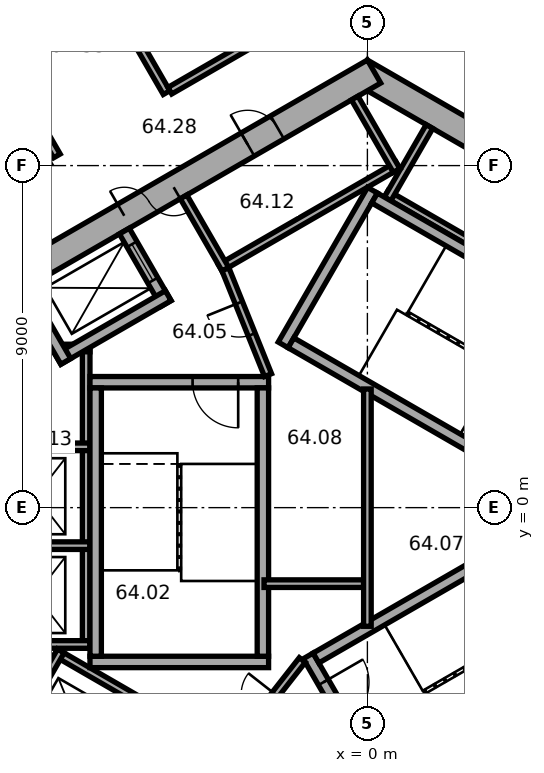
"""IFC4 building model, lengths in metres.
Left out: names, types, materials, properties, quantities, classifications, styles, units other than length and angle.
Written with IfcOpenShell. Run it as: python <this file> out.ifc"""

import sys

from ifc_helpers import new_model, si_unit, direction, frame, frame_2d, origin, place, context, subcontext, project, spatial, rectangle, extrude, element, fill, save


model = new_model("IFC4")
c1 = context("Model", 3, precision=1e-05, world=origin(), true_north=direction((0.0, 1.0)))
c2 = subcontext(c1, "Body", "Model", "MODEL_VIEW")
j1 = project(units=[si_unit("LENGTHUNIT", "METRE"), si_unit("PLANEANGLEUNIT", "RADIAN")], contexts=[c1])
p1 = place(None, origin())
s1 = spatial("IfcSite", under=j1, at=p1, CompositionType="ELEMENT")
p2 = place(p1, origin())
s2 = spatial("IfcBuilding", under=s1, at=p2, CompositionType="ELEMENT")
p3 = place(p2, frame((0.0, 0.0, 259.8)))
s3 = spatial("IfcBuildingStorey", under=s2, at=p3, CompositionType="ELEMENT", Elevation=259.8)
p4 = place(p3, frame((10.025, 5.586, 0.0), z_axis=(0.0, 0.0, 1.0), x_axis=(-0.866026453023, 0.499998182661, 0.0)))
e1 = element("IfcWall", 1, at=p4, inside=s3, PredefinedType="SHEAR", context=c2, shape_type="SweptSolid", body=[
    extrude(rectangle(XDim=11.778, YDim=0.7, at=frame_2d((5.889, 0.0))), origin(), (0.0, 0.0, 1.0), 3.7),
])
p5 = place(p4, frame((5.139, 0.0, 0.0)))
e2 = element("IfcOpeningElement", 2, at=p5, cuts=e1, PredefinedType="OPENING", context=c2, shape_type="SweptSolid", body=[
    extrude(rectangle(XDim=0.9, YDim=2.1, at=frame_2d((0.45, 1.05))), frame((0.0, 0.36, 0.0), z_axis=(0.0, -1.0, 0.0), x_axis=(1.0, 0.0, 0.0)), (0.0, 0.0, 1.0), 0.72),
])
p6 = place(p3, frame((0.175, 11.475, 0.0), z_axis=(0.0, 0.0, 1.0), x_axis=(-0.866026453023, -0.499998182661, 0.0)))
e3 = element("IfcWall", 3, at=p6, inside=s3, PredefinedType="SHEAR", context=c2, shape_type="SweptSolid", body=[
    extrude(rectangle(XDim=11.778, YDim=0.7, at=frame_2d((5.889, 0.0))), origin(), (0.0, 0.0, 1.0), 3.7),
])
p7 = place(p6, frame((6.089, 0.0, 0.0)))
e4 = element("IfcOpeningElement", 4, at=p7, cuts=e3, PredefinedType="OPENING", context=c2, shape_type="SweptSolid", body=[
    extrude(rectangle(XDim=1.5, YDim=2.1, at=frame_2d((0.75, 1.05))), frame((0.0, 0.36, 0.0), z_axis=(0.0, -1.0, 0.0), x_axis=(1.0, 0.0, 0.0)), (0.0, 0.0, 1.0), 0.72),
])
p8 = place(p6, frame((2.939, 0.0, 0.0)))
e5 = element("IfcOpeningElement", 5, at=p8, cuts=e3, PredefinedType="OPENING", context=c2, shape_type="SweptSolid", body=[
    extrude(rectangle(XDim=0.9, YDim=2.1, at=frame_2d((0.45, 1.05))), frame((0.0, 0.36, 0.0), z_axis=(0.0, -1.0, 0.0), x_axis=(1.0, 0.0, 0.0)), (0.0, 0.0, 1.0), 0.72),
])
p9 = place(p3, frame((-2.624, 20.713, 0.0), z_axis=(0.0, 0.0, 1.0), x_axis=(-0.866026460444, -0.499998169808, 0.0)))
e6 = element("IfcWall", 6, at=p9, inside=s3, PredefinedType="STANDARD", context=c2, shape_type="SweptSolid", body=[
    extrude(rectangle(XDim=17.731, YDim=0.2, at=frame_2d((8.866, 0.0))), origin(), (0.0, 0.0, 1.0), 3.7),
])
p10 = place(p9, frame((1.203, 0.0, 0.9)))
e7 = element("IfcOpeningElement", 7, at=p10, cuts=e6, PredefinedType="OPENING", context=c2, shape_type="SweptSolid", body=[
    extrude(rectangle(XDim=2.0, YDim=2.0, at=frame_2d((1.0, 1.0))), frame((0.0, 0.11, 0.0), z_axis=(0.0, -1.0, 0.0), x_axis=(1.0, 0.0, 0.0)), (0.0, 0.0, 1.0), 0.22),
])
p11 = place(p9, frame((4.535, 0.0, 0.9)))
e8 = element("IfcOpeningElement", 8, at=p11, cuts=e6, PredefinedType="OPENING", context=c2, shape_type="SweptSolid", body=[
    extrude(rectangle(XDim=2.0, YDim=2.0, at=frame_2d((1.0, 1.0))), frame((0.0, 0.11, 0.0), z_axis=(0.0, -1.0, 0.0), x_axis=(1.0, 0.0, 0.0)), (0.0, 0.0, 1.0), 0.22),
])
p12 = place(p9, frame((7.867, 0.0, 0.9)))
e9 = element("IfcOpeningElement", 9, at=p12, cuts=e6, PredefinedType="OPENING", context=c2, shape_type="SweptSolid", body=[
    extrude(rectangle(XDim=2.0, YDim=2.0, at=frame_2d((1.0, 1.0))), frame((0.0, 0.11, 0.0), z_axis=(0.0, -1.0, 0.0), x_axis=(1.0, 0.0, 0.0)), (0.0, 0.0, 1.0), 0.22),
])
p13 = place(p9, frame((11.198, 0.0, 0.9)))
e10 = element("IfcOpeningElement", 10, at=p13, cuts=e6, PredefinedType="OPENING", context=c2, shape_type="SweptSolid", body=[
    extrude(rectangle(XDim=2.0, YDim=2.0, at=frame_2d((1.0, 1.0))), frame((0.0, 0.11, 0.0), z_axis=(0.0, -1.0, 0.0), x_axis=(1.0, 0.0, 0.0)), (0.0, 0.0, 1.0), 0.22),
])
p14 = place(p9, frame((14.53, 0.0, 0.9)))
e11 = element("IfcOpeningElement", 11, at=p14, cuts=e6, PredefinedType="OPENING", context=c2, shape_type="SweptSolid", body=[
    extrude(rectangle(XDim=2.0, YDim=2.0, at=frame_2d((1.0, 1.0))), frame((0.0, 0.11, 0.0), z_axis=(0.0, -1.0, 0.0), x_axis=(1.0, 0.0, 0.0)), (0.0, 0.0, 1.0), 0.22),
])
p15 = place(p3, frame((7.424, 4.259, 0.0), z_axis=(0.0, 0.0, 1.0), x_axis=(-0.866026010844, 0.49999894854, 0.0)))
e12 = element("IfcWall", 12, at=p15, inside=s3, PredefinedType="PARTITIONING", context=c2, shape_type="SweptSolid", body=[
    extrude(rectangle(XDim=8.0, YDim=0.2, at=frame_2d((4.0, 0.0))), origin(), (0.0, 0.0, 1.0), 3.42),
])
p16 = place(p3, frame((0.532, 8.122, 0.0), z_axis=(0.0, 0.0, 1.0), x_axis=(0.500077893725, 0.86598042715, 0.0)))
e13 = element("IfcWall", 13, at=p16, inside=s3, PredefinedType="PARTITIONING", context=c2, shape_type="SweptSolid", body=[
    extrude(rectangle(XDim=2.2, YDim=0.2, at=frame_2d((1.1, 0.0))), origin(), (0.0, 0.0, 1.0), 3.42),
])
p17 = place(p3, frame((0.803, 9.009, 0.0), z_axis=(0.0, 0.0, 1.0), x_axis=(-0.866028230842, -0.499995103361, 0.0)))
e14 = element("IfcWall", 14, at=p17, inside=s3, PredefinedType="PARTITIONING", context=c2, shape_type="SweptSolid", body=[
    extrude(rectangle(XDim=5.4, YDim=0.2, at=frame_2d((2.7, 0.0))), origin(), (0.0, 0.0, 1.0), 3.42),
])
p18 = place(p3, frame((0.767, 8.872, 0.0), z_axis=(0.0, 0.0, 1.0), x_axis=(-0.499994660107, 0.866028486751, 0.0)))
e15 = element("IfcWall", 15, at=p18, inside=s3, PredefinedType="PARTITIONING", context=c2, shape_type="SweptSolid", body=[
    extrude(rectangle(XDim=2.2, YDim=0.2, at=frame_2d((1.1, 0.0))), origin(), (0.0, 0.0, 1.0), 3.42),
])
p19 = place(p3, frame((-3.737, 6.272, 0.0), z_axis=(0.0, 0.0, 1.0), x_axis=(-0.50002983664, 0.866008176907, 0.0)))
e16 = element("IfcWall", 16, at=p19, inside=s3, PredefinedType="PARTITIONING", context=c2, shape_type="SweptSolid", body=[
    extrude(rectangle(XDim=2.2, YDim=0.2, at=frame_2d((1.1, 0.0))), origin(), (0.0, 0.0, 1.0), 3.42),
])
p20 = place(p3, frame((-7.4, 4.3, 0.0), z_axis=(0.0, 0.0, 1.0), x_axis=(0.0, -1.0, 0.0)))
e17 = element("IfcWall", 17, at=p20, inside=s3, PredefinedType="PARTITIONING", context=c2, shape_type="SweptSolid", body=[
    extrude(rectangle(XDim=8.0, YDim=0.2, at=frame_2d((4.0, 0.0))), origin(), (0.0, 0.0, 1.0), 3.42),
])
for number, where, z_axis, x_axis in (
    (18, (-7.3, 4.2, 0.0), (0.0, 0.0, 1.0), (-1.0, 0.0, 0.0)),
    (19, (-7.3, 1.6, 0.0), (0.0, 0.0, 1.0), (-1.0, 0.0, 0.0)),
    (20, (-7.3, -1.0, 0.0), (0.0, 0.0, 1.0), (-1.0, 0.0, 0.0)),
    (21, (-7.3, -3.6, 0.0), (0.0, 0.0, 1.0), (-1.0, 0.0, 0.0)),
):
    element("IfcWall", number, at=place(p3, frame(where, z_axis=z_axis, x_axis=x_axis)), inside=s3, PredefinedType="PARTITIONING", context=c2, shape_type="SweptSolid", body=[
        extrude(rectangle(XDim=2.2, YDim=0.2, at=frame_2d((1.1, 0.0))), origin(), (0.0, 0.0, 1.0), 3.42),
    ])
p21 = place(p3, frame((-8.203, -3.809, 0.0), z_axis=(0.0, 0.0, 1.0), x_axis=(0.866028230842, -0.499995103361, 0.0)))
e22 = element("IfcWall", 22, at=p21, inside=s3, PredefinedType="PARTITIONING", context=c2, shape_type="SweptSolid", body=[
    extrude(rectangle(XDim=5.4, YDim=0.2, at=frame_2d((2.7, 0.0))), origin(), (0.0, 0.0, 1.0), 3.42),
])
p22 = place(p3, frame((-8.067, -3.772, 0.0), z_axis=(0.0, 0.0, 1.0), x_axis=(-0.50002983664, -0.866008176907, 0.0)))
e23 = element("IfcWall", 23, at=p22, inside=s3, PredefinedType="PARTITIONING", context=c2, shape_type="SweptSolid", body=[
    extrude(rectangle(XDim=2.2, YDim=0.2, at=frame_2d((1.1, 0.0))), origin(), (0.0, 0.0, 1.0), 3.42),
])
p23 = place(p3, frame((-0.024, -8.559, 0.0), z_axis=(0.0, 0.0, 1.0), x_axis=(0.866026010844, 0.49999894854, 0.0)))
e24 = element("IfcWall", 24, at=p23, inside=s3, PredefinedType="PARTITIONING", context=c2, shape_type="SweptSolid", body=[
    extrude(rectangle(XDim=8.0, YDim=0.2, at=frame_2d((4.0, 0.0))), origin(), (0.0, 0.0, 1.0), 3.42),
])
p24 = place(p3, frame((-2.216, 4.282, 0.0), z_axis=(0.0, 0.0, 1.0), x_axis=(0.499977259774, 0.866038532462, 0.0)))
e25 = element("IfcWall", 25, at=p24, inside=s3, PredefinedType="SHEAR", context=c2, shape_type="SweptSolid", body=[
    extrude(rectangle(XDim=4.7, YDim=0.3, at=frame_2d((2.35, 0.0))), origin(), (0.0, 0.0, 1.0), 3.42),
])
for number, where, z_axis, x_axis in (
    (26, (4.103, 0.807, 0.0), (0.0, 0.0, 1.0), (-0.866, 0.5, 0.0)),
    (27, (6.303, 4.617, 0.0), (0.0, 0.0, 1.0), (-0.866, 0.5, 0.0)),
):
    element("IfcWall", number, at=place(p3, frame(where, z_axis=z_axis, x_axis=x_axis)), inside=s3, PredefinedType="SHEAR", context=c2, shape_type="SweptSolid", body=[
        extrude(rectangle(XDim=7.06, YDim=0.3, at=frame_2d((3.53, 0.0))), origin(), (0.0, 0.0, 1.0), 3.42),
    ])
p25 = place(p3, frame((-2.6, 3.3, 0.0), z_axis=(0.0, 0.0, 1.0), x_axis=(-1.0, 0.0, 0.0)))
e28 = element("IfcWall", 28, at=p25, inside=s3, PredefinedType="SHEAR", context=c2, shape_type="SweptSolid", body=[
    extrude(rectangle(XDim=4.7, YDim=0.3, at=frame_2d((2.35, 0.0))), origin(), (0.0, 0.0, 1.0), 3.42),
])
p26 = place(p25, frame((0.8, 0.0, 0.0)))
e29 = element("IfcOpeningElement", 29, at=p26, cuts=e28, PredefinedType="OPENING", context=c2, shape_type="SweptSolid", body=[
    extrude(rectangle(XDim=1.2, YDim=2.1, at=frame_2d((0.6, 1.05))), frame((0.0, 0.16, 0.0), z_axis=(0.0, -1.0, 0.0), x_axis=(1.0, 0.0, 0.0)), (0.0, 0.0, 1.0), 0.32),
])
p27 = place(p3, frame((-2.6, -4.06, 0.0), z_axis=(0.0, 0.0, 1.0), x_axis=(-1.0, 0.0, 0.0)))
e30 = element("IfcWall", 30, at=p27, inside=s3, PredefinedType="SHEAR", context=c2, shape_type="SweptSolid", body=[
    extrude(rectangle(XDim=4.7, YDim=0.3, at=frame_2d((2.35, 0.0))), origin(), (0.0, 0.0, 1.0), 3.42),
])
for number, where, z_axis, x_axis in (
    (31, (-2.75, 3.15, 0.0), (0.0, 0.0, 1.0), (0.0, -1.0, 0.0)),
    (32, (-7.15, 3.15, 0.0), (0.0, 0.0, 1.0), (0.0, -1.0, 0.0)),
):
    element("IfcWall", number, at=place(p3, frame(where, z_axis=z_axis, x_axis=x_axis)), inside=s3, PredefinedType="SHEAR", context=c2, shape_type="SweptSolid", body=[
        extrude(rectangle(XDim=7.06, YDim=0.3, at=frame_2d((3.53, 0.0))), origin(), (0.0, 0.0, 1.0), 3.42),
    ])
p28 = place(p3, frame((-1.558, -3.902, 0.0), z_axis=(0.0, 0.0, 1.0), x_axis=(0.499977259774, -0.866038532462, 0.0)))
e33 = element("IfcWall", 33, at=p28, inside=s3, PredefinedType="SHEAR", context=c2, shape_type="SweptSolid", body=[
    extrude(rectangle(XDim=4.7, YDim=0.3, at=frame_2d((2.35, 0.0))), origin(), (0.0, 0.0, 1.0), 3.42),
])
p29 = place(p28, frame((0.8, 0.0, 0.0)))
e34 = element("IfcOpeningElement", 34, at=p29, cuts=e33, PredefinedType="OPENING", context=c2, shape_type="SweptSolid", body=[
    extrude(rectangle(XDim=1.2, YDim=2.1, at=frame_2d((0.6, 1.05))), frame((0.0, 0.16, 0.0), z_axis=(0.0, -1.0, 0.0), x_axis=(1.0, 0.0, 0.0)), (0.0, 0.0, 1.0), 0.32),
])
for number, where, z_axis, x_axis in (
    (35, (-1.353, -3.957, 0.0), (0.0, 0.0, 1.0), (0.866, 0.5, 0.0)),
    (36, (0.847, -7.767, 0.0), (0.0, 0.0, 1.0), (0.866, 0.5, 0.0)),
):
    element("IfcWall", number, at=place(p3, frame(where, z_axis=z_axis, x_axis=x_axis)), inside=s3, PredefinedType="SHEAR", context=c2, shape_type="SweptSolid", body=[
        extrude(rectangle(XDim=7.06, YDim=0.3, at=frame_2d((3.53, 0.0))), origin(), (0.0, 0.0, 1.0), 3.42),
    ])
p30 = place(p3, frame((-5.295, 5.372, 0.0), z_axis=(0.0, 0.0, 1.0), x_axis=(-0.500077893725, 0.86598042715, 0.0)))
e37 = element("IfcWall", 37, at=p30, inside=s3, PredefinedType="SHEAR", context=c2, shape_type="SweptSolid", body=[
    extrude(rectangle(XDim=2.2, YDim=0.3, at=frame_2d((1.1, 0.0))), origin(), (0.0, 0.0, 1.0), 3.42),
])
p31 = place(p30, frame((0.7, 0.0, 0.0)))
e38 = element("IfcOpeningElement", 38, at=p31, cuts=e37, PredefinedType="OPENING", context=c2, shape_type="SweptSolid", body=[
    extrude(rectangle(XDim=1.1, YDim=2.1, at=frame_2d((0.55, 1.05))), frame((0.0, 0.16, 0.0), z_axis=(0.0, -1.0, 0.0), x_axis=(1.0, 0.0, 0.0)), (0.0, 0.0, 1.0), 0.32),
])
p32 = place(p3, frame((-5.24, 5.577, 0.0), z_axis=(0.0, 0.0, 1.0), x_axis=(-0.866014461049, -0.500018952895, 0.0)))
e39 = element("IfcWall", 39, at=p32, inside=s3, PredefinedType="SHEAR", context=c2, shape_type="SweptSolid", body=[
    extrude(rectangle(XDim=3.35, YDim=0.3, at=frame_2d((1.675, 0.0))), origin(), (0.0, 0.0, 1.0), 3.42),
])
p33 = place(p3, frame((-7.937, 3.847, 0.0), z_axis=(0.0, 0.0, 1.0), x_axis=(-0.50002983664, 0.866008176907, 0.0)))
e40 = element("IfcWall", 40, at=p33, inside=s3, PredefinedType="SHEAR", context=c2, shape_type="SweptSolid", body=[
    extrude(rectangle(XDim=2.2, YDim=0.3, at=frame_2d((1.1, 0.0))), origin(), (0.0, 0.0, 1.0), 3.42),
])
p34 = place(p3, frame((-2.615, 3.487, 0.0), z_axis=(0.0, 0.0, 1.0), x_axis=(-0.373576831041, 0.92759924068, 0.0)))
e41 = element("IfcWall", 41, at=p34, inside=s3, PredefinedType="PARTITIONING", context=c2, shape_type="SweptSolid", body=[
    extrude(rectangle(XDim=3.002, YDim=0.2, at=frame_2d((1.501, 0.0))), origin(), (0.0, 0.0, 1.0), 3.42),
])
p35 = place(p34, frame((1.15, 0.0, 0.0)))
e42 = element("IfcOpeningElement", 42, at=p35, cuts=e41, PredefinedType="OPENING", context=c2, shape_type="SweptSolid", body=[
    extrude(rectangle(XDim=0.9, YDim=2.1, at=frame_2d((0.45, 1.05))), frame((0.0, 0.11, 0.0), z_axis=(0.0, -1.0, 0.0), x_axis=(1.0, 0.0, 0.0)), (0.0, 0.0, 1.0), 0.22),
])
p36 = place(p3, frame((-1.712, -4.008, 0.0), z_axis=(0.0, 0.0, 1.0), x_axis=(-0.616549420702, -0.787316208287, 0.0)))
e43 = element("IfcWall", 43, at=p36, inside=s3, PredefinedType="PARTITIONING", context=c2, shape_type="SweptSolid", body=[
    extrude(rectangle(XDim=3.002, YDim=0.2, at=frame_2d((1.501, 0.0))), origin(), (0.0, 0.0, 1.0), 3.42),
])
p37 = place(p36, frame((1.15, 0.0, 0.0)))
e44 = element("IfcOpeningElement", 44, at=p37, cuts=e43, PredefinedType="OPENING", context=c2, shape_type="SweptSolid", body=[
    extrude(rectangle(XDim=0.9, YDim=2.1, at=frame_2d((0.45, 1.05))), frame((0.0, 0.11, 0.0), z_axis=(0.0, -1.0, 0.0), x_axis=(1.0, 0.0, 0.0)), (0.0, 0.0, 1.0), 0.22),
])
p38 = place(p3, frame((-2.72, -2.0, 0.0), z_axis=(0.0, 0.0, 1.0), x_axis=(1.0, 0.0, 0.0)))
e45 = element("IfcWall", 45, at=p38, inside=s3, PredefinedType="PARTITIONING", context=c2, shape_type="SweptSolid", body=[
    extrude(rectangle(XDim=2.62, YDim=0.2, at=frame_2d((1.31, 0.0))), origin(), (0.0, 0.0, 1.0), 3.42),
])
p39 = place(p3, frame((0.0, -3.122, 0.0), z_axis=(0.0, 0.0, 1.0), x_axis=(0.0, 1.0, 0.0)))
e46 = element("IfcWall", 46, at=p39, inside=s3, PredefinedType="PARTITIONING", context=c2, shape_type="SweptSolid", body=[
    extrude(rectangle(XDim=6.245, YDim=0.2, at=frame_2d((3.122, 0.0))), origin(), (0.0, 0.0, 1.0), 3.42),
])
p40 = place(p3, frame((-11.345, 14.754, 0.0), z_axis=(0.0, 0.0, 1.0), x_axis=(0.500005339912, -0.866022320763, 0.0)))
e47 = element("IfcWall", 47, at=p40, inside=s3, PredefinedType="PARTITIONING", context=c2, shape_type="SweptSolid", body=[
    extrude(rectangle(XDim=6.35, YDim=0.2, at=frame_2d((3.175, 0.0))), origin(), (0.0, 0.0, 1.0), 3.42),
])
p41 = place(p40, frame((2.675, 0.0, 0.0)))
e48 = element("IfcOpeningElement", 48, at=p41, cuts=e47, PredefinedType="OPENING", context=c2, shape_type="SweptSolid", body=[
    extrude(rectangle(XDim=1.0, YDim=2.1, at=frame_2d((0.5, 1.05))), frame((0.0, 0.11, 0.0), z_axis=(0.0, -1.0, 0.0), x_axis=(1.0, 0.0, 0.0)), (0.0, 0.0, 1.0), 0.22),
])
p42 = place(p3, frame((-8.46, 16.42, 0.0), z_axis=(0.0, 0.0, 1.0), x_axis=(0.500005339912, -0.866022320763, 0.0)))
e49 = element("IfcWall", 49, at=p42, inside=s3, PredefinedType="PARTITIONING", context=c2, shape_type="SweptSolid", body=[
    extrude(rectangle(XDim=6.35, YDim=0.2, at=frame_2d((3.175, 0.0))), origin(), (0.0, 0.0, 1.0), 2.87),
])
p43 = place(p42, frame((2.675, 0.0, 0.0)))
e50 = element("IfcOpeningElement", 50, at=p43, cuts=e49, PredefinedType="OPENING", context=c2, shape_type="SweptSolid", body=[
    extrude(rectangle(XDim=1.0, YDim=2.1, at=frame_2d((0.5, 1.05))), frame((0.0, 0.11, 0.0), z_axis=(0.0, -1.0, 0.0), x_axis=(1.0, 0.0, 0.0)), (0.0, 0.0, 1.0), 0.22),
])
p44 = place(p3, frame((-0.95, 13.423, 0.0), z_axis=(0.0, 0.0, 1.0), x_axis=(-0.86603557629, -0.499982380289, 0.0)))
e51 = element("IfcWall", 51, at=p44, inside=s3, PredefinedType="PARTITIONING", context=c2, shape_type="SweptSolid", body=[
    extrude(rectangle(XDim=4.906, YDim=0.2, at=frame_2d((2.453, 0.0))), origin(), (0.0, 0.0, 1.0), 3.42),
])
p45 = place(p3, frame((11.15, 7.534, 0.0), z_axis=(0.0, 0.0, 1.0), x_axis=(-0.866026603062, 0.499997922785, 0.0)))
e52 = element("IfcWall", 52, at=p45, inside=s3, PredefinedType="PARTITIONING", context=c2, shape_type="SweptSolid", body=[
    extrude(rectangle(XDim=11.738, YDim=0.2, at=frame_2d((5.869, 0.0))), origin(), (0.0, 0.0, 1.0), 3.42),
])
p46 = place(p45, frame((5.345, 0.0, 0.0)))
e53 = element("IfcOpeningElement", 53, at=p46, cuts=e52, PredefinedType="OPENING", context=c2, shape_type="SweptSolid", body=[
    extrude(rectangle(XDim=1.0, YDim=2.1, at=frame_2d((0.5, 1.05))), frame((0.0, 0.11, 0.0), z_axis=(0.0, -1.0, 0.0), x_axis=(1.0, 0.0, 0.0)), (0.0, 0.0, 1.0), 0.22),
])
p47 = place(p7, origin())
e54 = element("IfcDoor", 54, at=p47, inside=s3, OperationType="DOUBLE_DOOR_SINGLE_SWING", PredefinedType="DOOR", context=c2, shape_type="SweptSolid", body=[
    extrude(rectangle(XDim=1.5, YDim=2.1, at=frame_2d((0.75, 1.05))), frame((0.0, 0.025, 0.0), z_axis=(0.0, -1.0, 0.0), x_axis=(1.0, 0.0, 0.0)), (0.0, 0.0, 1.0), 0.05),
])
fill(e4, e54)
p48 = place(p26, origin())
e55 = element("IfcDoor", 55, at=p48, inside=s3, OperationType="SINGLE_SWING_RIGHT", PredefinedType="DOOR", context=c2, shape_type="SweptSolid", body=[
    extrude(rectangle(XDim=1.2, YDim=2.1, at=frame_2d((0.6, 1.05))), frame((0.0, 0.025, 0.0), z_axis=(0.0, -1.0, 0.0), x_axis=(1.0, 0.0, 0.0)), (0.0, 0.0, 1.0), 0.05),
])
fill(e29, e55)
p49 = place(p29, origin())
e56 = element("IfcDoor", 56, at=p49, inside=s3, OperationType="SINGLE_SWING_RIGHT", PredefinedType="DOOR", context=c2, shape_type="SweptSolid", body=[
    extrude(rectangle(XDim=1.2, YDim=2.1, at=frame_2d((0.6, 1.05))), frame((0.0, 0.025, 0.0), z_axis=(0.0, -1.0, 0.0), x_axis=(1.0, 0.0, 0.0)), (0.0, 0.0, 1.0), 0.05),
])
fill(e34, e56)
p50 = place(p35, origin())
e57 = element("IfcDoor", 57, at=p50, inside=s3, OperationType="SINGLE_SWING_LEFT", PredefinedType="DOOR", context=c2, shape_type="SweptSolid", body=[
    extrude(rectangle(XDim=0.9, YDim=2.1, at=frame_2d((0.45, 1.05))), frame((0.0, 0.025, 0.0), z_axis=(0.0, -1.0, 0.0), x_axis=(1.0, 0.0, 0.0)), (0.0, 0.0, 1.0), 0.05),
])
fill(e42, e57)
p51 = place(p37, origin())
e58 = element("IfcDoor", 58, at=p51, inside=s3, OperationType="SINGLE_SWING_LEFT", PredefinedType="DOOR", context=c2, shape_type="SweptSolid", body=[
    extrude(rectangle(XDim=0.9, YDim=2.1, at=frame_2d((0.45, 1.05))), frame((0.0, 0.025, 0.0), z_axis=(0.0, -1.0, 0.0), x_axis=(1.0, 0.0, 0.0)), (0.0, 0.0, 1.0), 0.05),
])
fill(e44, e58)
p52 = place(p8, origin())
e59 = element("IfcDoor", 59, at=p52, inside=s3, OperationType="SINGLE_SWING_LEFT", PredefinedType="DOOR", context=c2, shape_type="SweptSolid", body=[
    extrude(rectangle(XDim=0.9, YDim=2.1, at=frame_2d((0.45, 1.05))), frame((0.0, 0.025, 0.0), z_axis=(0.0, -1.0, 0.0), x_axis=(1.0, 0.0, 0.0)), (0.0, 0.0, 1.0), 0.05),
])
fill(e5, e59)
p53 = place(p31, origin())
e60 = element("IfcDoor", 60, at=p53, inside=s3, OperationType="DOUBLE_DOOR_SLIDING", PredefinedType="DOOR", context=c2, shape_type="SweptSolid", body=[
    extrude(rectangle(XDim=1.1, YDim=2.1, at=frame_2d((0.55, 1.05))), frame((0.0, 0.025, 0.0), z_axis=(0.0, -1.0, 0.0), x_axis=(1.0, 0.0, 0.0)), (0.0, 0.0, 1.0), 0.05),
])
fill(e38, e60)
save(model, sys.argv[1])
